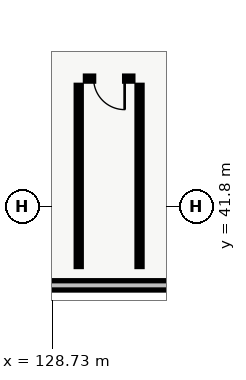
"""IFC4 building model, lengths in metres.
Left out: names, types, materials, properties, quantities, classifications, styles, units other than length and angle.
Written with IfcOpenShell. Run it as: python <this file> out.ifc"""

import sys

from ifc_helpers import new_model, si_unit, direction, frame, frame_2d, origin, place, context, subcontext, project, spatial, rectangle, extrude, element, fill, save


model = new_model("IFC4")
c1 = context("Model", 3, precision=1e-05, world=origin(), true_north=direction((0.0, 1.0)))
c2 = subcontext(c1, "Body", "Model", "MODEL_VIEW")
j1 = project(units=[si_unit("LENGTHUNIT", "METRE"), si_unit("PLANEANGLEUNIT", "RADIAN")], contexts=[c1])
p1 = place(None, origin())
s1 = spatial("IfcSite", under=j1, at=p1, CompositionType="ELEMENT")
p2 = place(p1, origin())
s2 = spatial("IfcBuilding", under=s1, at=p2, CompositionType="ELEMENT")
p3 = place(p2, frame((0.0, 0.0, 32.1)))
s3 = spatial("IfcBuildingStorey", under=s2, at=p3, CompositionType="ELEMENT", Elevation=32.1)
p4 = place(p3, frame((134.13, 39.2, 0.0), z_axis=(0.0, 0.0, 1.0), x_axis=(-1.0, 0.0, 0.0)))
e1 = element("IfcWall", 1, at=p4, inside=s3, PredefinedType="STANDARD", context=c2, shape_type="SweptSolid", body=[
    extrude(rectangle(XDim=6.06, YDim=0.305, at=frame_2d((3.03, 0.0))), origin(), (0.0, 0.0, 1.0), 3.79),
])
p5 = place(p3, frame((131.6, 39.82, 0.0), z_axis=(0.0, 0.0, 1.0), x_axis=(0.0, 1.0, 0.0)))
e2 = element("IfcWall", 2, at=p5, inside=s3, PredefinedType="PARTITIONING", context=c2, shape_type="SweptSolid", body=[
    extrude(rectangle(XDim=5.96, YDim=0.165, at=frame_2d((2.98, 0.0))), origin(), (0.0, 0.0, 1.0), 3.95),
])
p6 = place(p3, frame((131.38, 46.0, 0.0), z_axis=(0.0, 0.0, 1.0), x_axis=(-1.0, 0.0, 0.0)))
e3 = element("IfcWall", 3, at=p6, inside=s3, PredefinedType="PARTITIONING", context=c2, shape_type="SweptSolid", body=[
    extrude(rectangle(XDim=1.56, YDim=0.165, at=frame_2d((0.78, 0.0))), origin(), (0.0, 0.0, 1.0), 3.95),
])
p7 = place(p6, frame((0.27, 0.0, 0.0)))
e4 = element("IfcOpeningElement", 4, at=p7, cuts=e3, PredefinedType="OPENING", context=c2, shape_type="SweptSolid", body=[
    extrude(rectangle(XDim=1.02, YDim=2.15, at=frame_2d((0.51, 1.075))), frame((0.0, 0.083, 0.0), z_axis=(0.0, -1.0, 0.0), x_axis=(1.0, 0.0, 0.0)), (0.0, 0.0, 1.0), 0.165),
])
p8 = place(p3, frame((129.6, 45.78, 0.0), z_axis=(0.0, 0.0, 1.0), x_axis=(0.0, -1.0, 0.0)))
e5 = element("IfcWall", 5, at=p8, inside=s3, PredefinedType="PARTITIONING", context=c2, shape_type="SweptSolid", body=[
    extrude(rectangle(XDim=5.96, YDim=0.165, at=frame_2d((2.98, 0.0))), origin(), (0.0, 0.0, 1.0), 3.95),
])
p9 = place(p7, origin())
e6 = element("IfcDoor", 6, at=p9, inside=s3, OperationType="SINGLE_SWING_LEFT", PredefinedType="DOOR", context=c2, shape_type="SweptSolid", body=[
    extrude(rectangle(XDim=1.02, YDim=2.15, at=frame_2d((0.51, 1.075))), frame((0.0, 0.025, 0.0), z_axis=(0.0, -1.0, 0.0), x_axis=(1.0, 0.0, 0.0)), (0.0, 0.0, 1.0), 0.05),
])
fill(e4, e6)
save(model, sys.argv[1])
